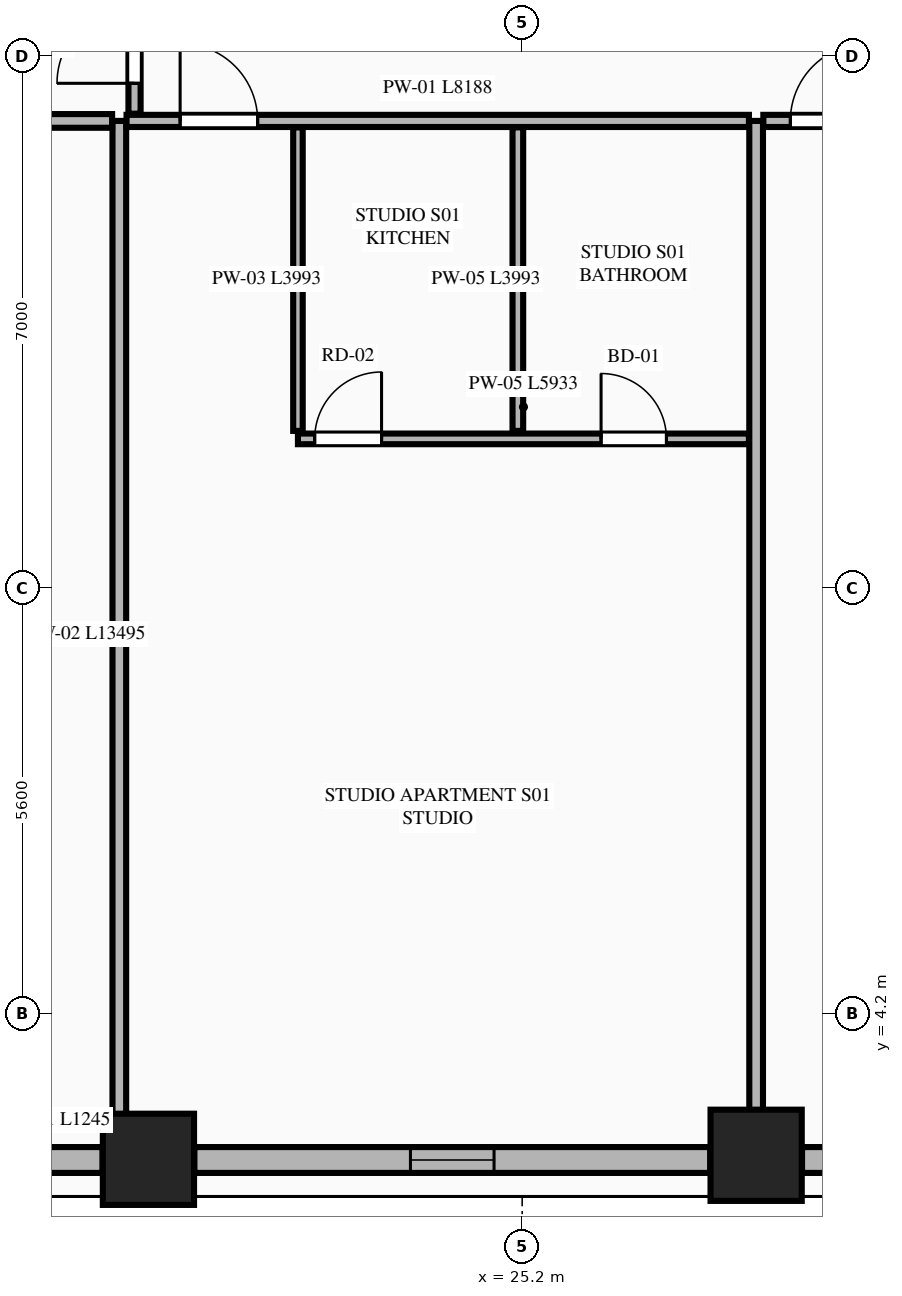
"""IFC4 building model, lengths in metres.
Left out: names, types, materials, properties, quantities, classifications, styles, units other than length and angle.
Written with IfcOpenShell. Run it as: python <this file> out.ifc"""

import sys

from ifc_helpers import new_model, si_unit, direction, frame, frame_2d, origin, origin_2d, place, context, subcontext, project, spatial, rectangle, extrude, element, fill, save


model = new_model("IFC4")
c1 = context("Model", 3, precision=1e-05, world=origin(), true_north=direction((0.0, 1.0)))
c2 = subcontext(c1, "Body", "Model", "MODEL_VIEW")
j1 = project(units=[si_unit("LENGTHUNIT", "METRE"), si_unit("PLANEANGLEUNIT", "RADIAN")], contexts=[c1])
p1 = place(None, origin())
s1 = spatial("IfcSite", under=j1, at=p1, CompositionType="ELEMENT")
p2 = place(p1, origin())
s2 = spatial("IfcBuilding", under=s1, at=p2, CompositionType="ELEMENT")
p3 = place(p2, frame((0.0, 0.0, 39.1)))
s3 = spatial("IfcBuildingStorey", under=s2, at=p3, CompositionType="ELEMENT", Elevation=39.1)
for number, where, z_axis, x_axis in (
    (1, (20.283, 2.289, 0.0), (0.0, 0.0, 1.0), (1.0, 0.0, 0.0)),
    (2, (28.278, 2.342, 0.0), (0.0, 0.0, 1.0), (1.0, 0.0, 0.0)),
):
    element("IfcColumn", number, at=place(p3, frame(where, z_axis=z_axis, x_axis=x_axis)), inside=s3, PredefinedType="COLUMN", context=c2, shape_type="SweptSolid", body=[
        extrude(rectangle(XDim=1.2, YDim=1.2, at=origin_2d()), origin(), (0.0, 0.0, 1.0), 3.55),
    ])
p4 = place(p3, frame((18.434, 2.28, 0.0), z_axis=(0.0, 0.0, 1.0), x_axis=(1.0, 0.0, 0.0)))
e3 = element("IfcWall", 3, at=p4, inside=s3, PredefinedType="STANDARD", context=c2, shape_type="SweptSolid", body=[
    extrude(rectangle(XDim=1.245, YDim=0.34, at=frame_2d((0.623, 0.0))), origin(), (0.0, 0.0, 1.0), 3.33),
])
p5 = place(p3, frame((20.887, 2.28, 0.0), z_axis=(0.0, 0.0, 1.0), x_axis=(1.0, 0.0, 0.0)))
e4 = element("IfcWall", 4, at=p5, inside=s3, PredefinedType="STANDARD", context=c2, shape_type="SweptSolid", body=[
    extrude(rectangle(XDim=6.787, YDim=0.34, at=frame_2d((3.394, 0.0))), origin(), (0.0, 0.0, 1.0), 2.787),
])
p6 = place(p5, frame((2.843, 0.0, 0.75)))
e5 = element("IfcOpeningElement", 5, at=p6, cuts=e4, PredefinedType="OPENING", context=c2, shape_type="SweptSolid", body=[
    extrude(rectangle(XDim=1.1, YDim=1.887, at=frame_2d((0.55, 0.943))), frame((0.0, 0.18, 0.0), z_axis=(0.0, -1.0, 0.0), x_axis=(1.0, 0.0, 0.0)), (0.0, 0.0, 1.0), 0.36),
])
p7 = place(p3, frame((28.882, 2.28, 0.0), z_axis=(0.0, 0.0, 1.0), x_axis=(1.0, 0.0, 0.0)))
e6 = element("IfcWall", 6, at=p7, inside=s3, PredefinedType="STANDARD", context=c2, shape_type="SweptSolid", body=[
    extrude(rectangle(XDim=7.036, YDim=0.34, at=frame_2d((3.518, 0.0))), origin(), (0.0, 0.0, 1.0), 2.787),
])
p8 = place(p7, frame((2.968, 0.0, 0.75)))
e7 = element("IfcOpeningElement", 7, at=p8, cuts=e6, PredefinedType="OPENING", context=c2, shape_type="SweptSolid", body=[
    extrude(rectangle(XDim=1.1, YDim=1.887, at=frame_2d((0.55, 0.943))), frame((0.0, 0.18, 0.0), z_axis=(0.0, -1.0, 0.0), x_axis=(1.0, 0.0, 0.0)), (0.0, 0.0, 1.0), 0.36),
])
p9 = place(p3, frame((19.9, 2.455, 0.0), z_axis=(0.0, 0.0, 1.0), x_axis=(0.0, 1.0, 0.0)))
e8 = element("IfcWall", 8, at=p9, inside=s3, PredefinedType="PARTITIONING", context=c2, shape_type="SweptSolid", body=[
    extrude(rectangle(XDim=13.495, YDim=0.18, at=frame_2d((6.748, 0.0))), origin(), (0.0, 0.0, 1.0), 3.33),
])
p10 = place(p3, frame((28.278, 2.455, 0.0), z_axis=(0.0, 0.0, 1.0), x_axis=(0.0, 1.0, 0.0)))
e9 = element("IfcWall", 9, at=p10, inside=s3, PredefinedType="PARTITIONING", context=c2, shape_type="SweptSolid", body=[
    extrude(rectangle(XDim=13.495, YDim=0.18, at=frame_2d((6.748, 0.0))), origin(), (0.0, 0.0, 1.0), 2.636),
])
p11 = place(p3, frame((19.995, 15.95, 0.0), z_axis=(0.0, 0.0, 1.0), x_axis=(1.0, 0.0, 0.0)))
e10 = element("IfcWall", 10, at=p11, inside=s3, PredefinedType="PARTITIONING", context=c2, shape_type="SweptSolid", body=[
    extrude(rectangle(XDim=8.188, YDim=0.16, at=frame_2d((4.094, 0.0))), origin(), (0.0, 0.0, 1.0), 3.33),
])
p12 = place(p11, frame((0.705, 0.0, 0.0)))
e11 = element("IfcOpeningElement", 11, at=p12, cuts=e10, PredefinedType="OPENING", context=c2, shape_type="SweptSolid", body=[
    extrude(rectangle(XDim=1.02, YDim=2.25, at=frame_2d((0.51, 1.125))), frame((0.0, 0.09, 0.0), z_axis=(0.0, -1.0, 0.0), x_axis=(1.0, 0.0, 0.0)), (0.0, 0.0, 1.0), 0.18),
])
p13 = place(p3, frame((22.25, 11.872, 0.0), z_axis=(0.0, 0.0, 1.0), x_axis=(0.0, 1.0, 0.0)))
e12 = element("IfcWall", 12, at=p13, inside=s3, PredefinedType="PARTITIONING", context=c2, shape_type="SweptSolid", body=[
    extrude(rectangle(XDim=3.993, YDim=0.125, at=frame_2d((1.997, 0.0))), origin(), (0.0, 0.0, 1.0), 2.636),
])
p14 = place(p3, frame((22.25, 11.767, 0.0), z_axis=(0.0, 0.0, 1.0), x_axis=(1.0, 0.0, 0.0)))
e13 = element("IfcWall", 13, at=p14, inside=s3, PredefinedType="PLUMBINGWALL", context=c2, shape_type="SweptSolid", body=[
    extrude(rectangle(XDim=5.933, YDim=0.14, at=frame_2d((2.967, 0.0))), origin(), (0.0, 0.0, 1.0), 3.33),
])
p15 = place(p14, frame((3.988, 0.0, 0.0)))
e14 = element("IfcOpeningElement", 14, at=p15, cuts=e13, PredefinedType="OPENING", context=c2, shape_type="SweptSolid", body=[
    extrude(rectangle(XDim=0.86, YDim=2.1, at=frame_2d((0.43, 1.05))), frame((0.0, 0.08, 0.0), z_axis=(0.0, -1.0, 0.0), x_axis=(1.0, 0.0, 0.0)), (0.0, 0.0, 1.0), 0.16),
])
p16 = place(p14, frame((0.22, 0.0, 0.0)))
e15 = element("IfcOpeningElement", 15, at=p16, cuts=e13, PredefinedType="OPENING", context=c2, shape_type="SweptSolid", body=[
    extrude(rectangle(XDim=0.88, YDim=2.15, at=frame_2d((0.44, 1.075))), frame((0.0, 0.08, 0.0), z_axis=(0.0, -1.0, 0.0), x_axis=(1.0, 0.0, 0.0)), (0.0, 0.0, 1.0), 0.16),
])
p17 = place(p3, frame((25.143, 11.872, 0.0), z_axis=(0.0, 0.0, 1.0), x_axis=(0.0, 1.0, 0.0)))
e16 = element("IfcWall", 16, at=p17, inside=s3, PredefinedType="PLUMBINGWALL", context=c2, shape_type="SweptSolid", body=[
    extrude(rectangle(XDim=3.993, YDim=0.14, at=frame_2d((1.997, 0.0))), origin(), (0.0, 0.0, 1.0), 3.33),
])
p18 = place(p3, frame((28.373, 15.95, 0.0), z_axis=(0.0, 0.0, 1.0), x_axis=(1.0, 0.0, 0.0)))
e17 = element("IfcWall", 17, at=p18, inside=s3, PredefinedType="PARTITIONING", context=c2, shape_type="SweptSolid", body=[
    extrude(rectangle(XDim=8.054, YDim=0.16, at=frame_2d((4.027, 0.0))), origin(), (0.0, 0.0, 1.0), 3.33),
])
p19 = place(p18, frame((0.355, 0.0, 0.0)))
e18 = element("IfcOpeningElement", 18, at=p19, cuts=e17, PredefinedType="OPENING", context=c2, shape_type="SweptSolid", body=[
    extrude(rectangle(XDim=1.02, YDim=2.25, at=frame_2d((0.51, 1.125))), frame((0.0, 0.09, 0.0), z_axis=(0.0, -1.0, 0.0), x_axis=(1.0, 0.0, 0.0)), (0.0, 0.0, 1.0), 0.18),
])
p20 = place(p3, frame((10.564, 15.95, 0.0), z_axis=(0.0, 0.0, 1.0), x_axis=(1.0, 0.0, 0.0)))
e19 = element("IfcWall", 19, at=p20, inside=s3, PredefinedType="PARTITIONING", context=c2, shape_type="SweptSolid", body=[
    extrude(rectangle(XDim=9.241, YDim=0.18, at=frame_2d((4.621, 0.0))), origin(), (0.0, 0.0, 1.0), 3.33),
])
p21 = place(p3, frame((20.1, 16.045, 0.0), z_axis=(0.0, 0.0, 1.0), x_axis=(0.0, 1.0, 0.0)))
e20 = element("IfcWall", 20, at=p21, inside=s3, PredefinedType="PARTITIONING", context=c2, shape_type="SweptSolid", body=[
    extrude(rectangle(XDim=6.576, YDim=0.16, at=frame_2d((3.288, 0.0))), origin(), (0.0, 0.0, 1.0), 3.33),
])
p22 = place(p21, frame((0.4, 0.0, 0.0)))
e21 = element("IfcOpeningElement", 21, at=p22, cuts=e20, PredefinedType="OPENING", context=c2, shape_type="SweptSolid", body=[
    extrude(rectangle(XDim=1.02, YDim=2.25, at=frame_2d((0.51, 1.125))), frame((0.0, 0.09, 0.0), z_axis=(0.0, -1.0, 0.0), x_axis=(1.0, 0.0, 0.0)), (0.0, 0.0, 1.0), 0.18),
])
p23 = place(p6, origin())
e22 = element("IfcWindow", 22, at=p23, inside=s3, PartitioningType="SINGLE_PANEL", PredefinedType="WINDOW", context=c2, shape_type="SweptSolid", body=[
    extrude(rectangle(XDim=1.1, YDim=1.887, at=frame_2d((0.55, 0.943))), frame((0.0, 0.03, 0.0), z_axis=(0.0, -1.0, 0.0), x_axis=(1.0, 0.0, 0.0)), (0.0, 0.0, 1.0), 0.06),
])
fill(e5, e22)
p24 = place(p15, origin())
e23 = element("IfcDoor", 23, at=p24, inside=s3, OperationType="SINGLE_SWING_LEFT", PredefinedType="DOOR", context=c2, shape_type="SweptSolid", body=[
    extrude(rectangle(XDim=0.86, YDim=2.1, at=frame_2d((0.43, 1.05))), frame((0.0, 0.025, 0.0), z_axis=(0.0, -1.0, 0.0), x_axis=(1.0, 0.0, 0.0)), (0.0, 0.0, 1.0), 0.05),
])
fill(e14, e23)
p25 = place(p12, origin())
e24 = element("IfcDoor", 24, at=p25, inside=s3, OperationType="SINGLE_SWING_LEFT", PredefinedType="DOOR", context=c2, shape_type="SweptSolid", body=[
    extrude(rectangle(XDim=1.02, YDim=2.25, at=frame_2d((0.51, 1.125))), frame((0.0, 0.025, 0.0), z_axis=(0.0, -1.0, 0.0), x_axis=(1.0, 0.0, 0.0)), (0.0, 0.0, 1.0), 0.05),
])
fill(e11, e24)
p26 = place(p16, origin())
e25 = element("IfcDoor", 25, at=p26, inside=s3, OperationType="SINGLE_SWING_RIGHT", PredefinedType="DOOR", context=c2, shape_type="SweptSolid", body=[
    extrude(rectangle(XDim=0.88, YDim=2.15, at=frame_2d((0.44, 1.075))), frame((0.0, 0.025, 0.0), z_axis=(0.0, -1.0, 0.0), x_axis=(1.0, 0.0, 0.0)), (0.0, 0.0, 1.0), 0.05),
])
fill(e15, e25)
p27 = place(p19, origin())
e26 = element("IfcDoor", 26, at=p27, inside=s3, OperationType="SINGLE_SWING_RIGHT", PredefinedType="DOOR", context=c2, shape_type="SweptSolid", body=[
    extrude(rectangle(XDim=1.02, YDim=2.25, at=frame_2d((0.51, 1.125))), frame((0.0, 0.025, 0.0), z_axis=(0.0, -1.0, 0.0), x_axis=(1.0, 0.0, 0.0)), (0.0, 0.0, 1.0), 0.05),
])
fill(e18, e26)
p28 = place(p22, origin())
e27 = element("IfcDoor", 27, at=p28, inside=s3, OperationType="SINGLE_SWING_LEFT", PredefinedType="DOOR", context=c2, shape_type="SweptSolid", body=[
    extrude(rectangle(XDim=1.02, YDim=2.25, at=frame_2d((0.51, 1.125))), frame((0.0, 0.025, 0.0), z_axis=(0.0, -1.0, 0.0), x_axis=(1.0, 0.0, 0.0)), (0.0, 0.0, 1.0), 0.05),
])
fill(e21, e27)
save(model, sys.argv[1])
